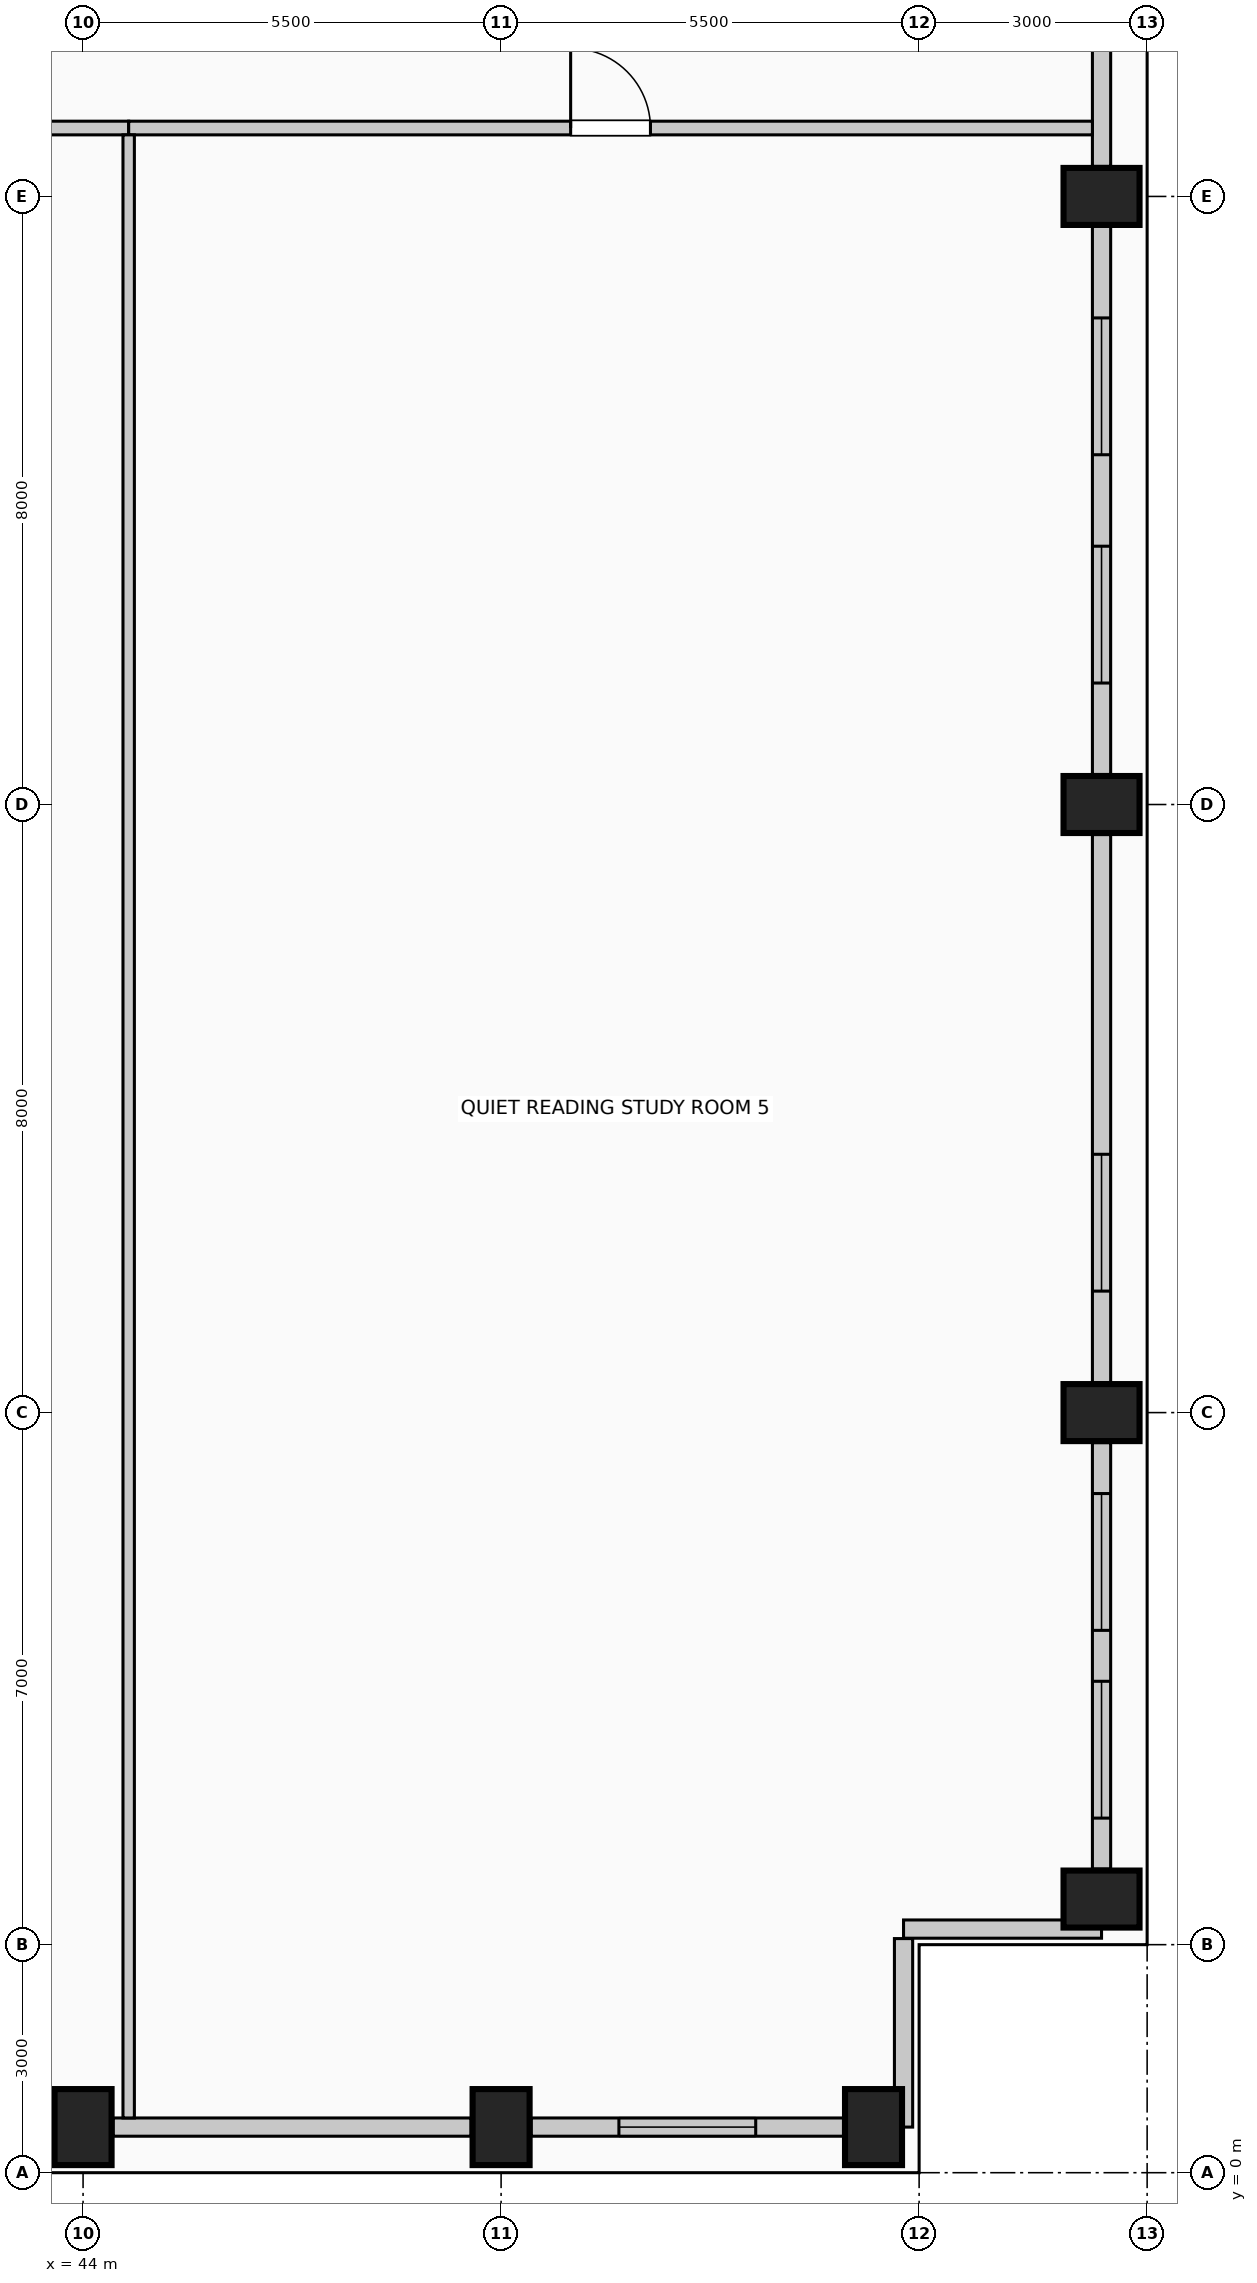
"""IFC4 building model, lengths in metres.
Left out: names, types, materials, properties, quantities, classifications, styles, units other than length and angle.
Written with IfcOpenShell. Run it as: python <this file> out.ifc"""

import sys

from ifc_helpers import new_model, si_unit, direction, frame, frame_2d, origin, origin_2d, place, context, subcontext, project, spatial, rectangle, extrude, element, fill, save


model = new_model("IFC4")
c1 = context("Model", 3, precision=1e-05, world=origin(), true_north=direction((0.0, 1.0)))
c2 = subcontext(c1, "Body", "Model", "MODEL_VIEW")
j1 = project(units=[si_unit("LENGTHUNIT", "METRE"), si_unit("PLANEANGLEUNIT", "RADIAN")], contexts=[c1])
p1 = place(None, origin())
s1 = spatial("IfcSite", under=j1, at=p1, CompositionType="ELEMENT")
p2 = place(p1, origin())
s2 = spatial("IfcBuilding", under=s1, at=p2, CompositionType="ELEMENT")
p3 = place(p2, frame((0.0, 0.0, 230.6)))
s3 = spatial("IfcBuildingStorey", under=s2, at=p3, CompositionType="ELEMENT", Elevation=230.6)
for number, where, z_axis, x_axis in (
    (1, (44.0, 0.6, 0.0), (0.0, 0.0, 1.0), (1.0, 0.0, 0.0)),
    (2, (49.5, 0.6, 0.0), (0.0, 0.0, 1.0), (1.0, 0.0, 0.0)),
    (3, (54.4, 0.6, 0.0), (0.0, 0.0, 1.0), (1.0, 0.0, 0.0)),
    (4, (57.4, 3.6, 0.0), (0.0, 0.0, 1.0), (0.0, 1.0, 0.0)),
    (5, (57.4, 10.0, 0.0), (0.0, 0.0, 1.0), (0.0, 1.0, 0.0)),
    (6, (57.4, 18.0, 0.0), (0.0, 0.0, 1.0), (0.0, 1.0, 0.0)),
    (7, (57.4, 26.0, 0.0), (0.0, 0.0, 1.0), (0.0, 1.0, 0.0)),
):
    element("IfcColumn", number, at=place(p3, frame(where, z_axis=z_axis, x_axis=x_axis)), inside=s3, PredefinedType="COLUMN", context=c2, shape_type="SweptSolid", body=[
        extrude(rectangle(XDim=0.75, YDim=1.0, at=origin_2d()), origin(), (0.0, 0.0, 1.0), 4.0),
    ])
p4 = place(p3, frame((43.605, 0.6, 0.0), z_axis=(0.0, 0.0, 1.0), x_axis=(-1.0, 0.0, 0.0)))
e8 = element("IfcWall", 8, at=p4, inside=s3, PredefinedType="SOLIDWALL", context=c2, shape_type="SweptSolid", body=[
    extrude(rectangle(XDim=1.485, YDim=0.24, at=frame_2d((0.742, 0.0))), origin(), (0.0, 0.0, 1.0), 3.0),
])
p5 = place(p3, frame((49.105, 0.6, 0.0), z_axis=(0.0, 0.0, 1.0), x_axis=(-1.0, 0.0, 0.0)))
e9 = element("IfcWall", 9, at=p5, inside=s3, PredefinedType="SOLIDWALL", context=c2, shape_type="SweptSolid", body=[
    extrude(rectangle(XDim=4.71, YDim=0.24, at=frame_2d((2.355, 0.0))), origin(), (0.0, 0.0, 1.0), 3.0),
])
p6 = place(p3, frame((54.005, 0.6, 0.0), z_axis=(0.0, 0.0, 1.0), x_axis=(-1.0, 0.0, 0.0)))
e10 = element("IfcWall", 10, at=p6, inside=s3, PredefinedType="SOLIDWALL", context=c2, shape_type="SweptSolid", body=[
    extrude(rectangle(XDim=4.11, YDim=0.24, at=frame_2d((2.055, 0.0))), origin(), (0.0, 0.0, 1.0), 3.0),
])
p7 = place(p6, frame((1.155, 0.0, 0.42)))
e11 = element("IfcOpeningElement", 11, at=p7, cuts=e10, PredefinedType="OPENING", context=c2, shape_type="SweptSolid", body=[
    extrude(rectangle(XDim=1.8, YDim=2.2, at=frame_2d((0.9, 1.1))), frame((0.0, 0.13, 0.0), z_axis=(0.0, -1.0, 0.0), x_axis=(1.0, 0.0, 0.0)), (0.0, 0.0, 1.0), 0.26),
])
p8 = place(p3, frame((57.4, 9.605, 0.0), z_axis=(0.0, 0.0, 1.0), x_axis=(0.0, -1.0, 0.0)))
e12 = element("IfcWall", 12, at=p8, inside=s3, PredefinedType="SOLIDWALL", context=c2, shape_type="SweptSolid", body=[
    extrude(rectangle(XDim=5.61, YDim=0.24, at=frame_2d((2.805, 0.0))), origin(), (0.0, 0.0, 1.0), 3.0),
])
p9 = place(p8, frame((0.67, 0.0, 0.42)))
e13 = element("IfcOpeningElement", 13, at=p9, cuts=e12, PredefinedType="OPENING", context=c2, shape_type="SweptSolid", body=[
    extrude(rectangle(XDim=1.8, YDim=2.2, at=frame_2d((0.9, 1.1))), frame((0.0, 0.13, 0.0), z_axis=(0.0, -1.0, 0.0), x_axis=(1.0, 0.0, 0.0)), (0.0, 0.0, 1.0), 0.26),
])
p10 = place(p8, frame((3.14, 0.0, 0.42)))
e14 = element("IfcOpeningElement", 14, at=p10, cuts=e12, PredefinedType="OPENING", context=c2, shape_type="SweptSolid", body=[
    extrude(rectangle(XDim=1.8, YDim=2.2, at=frame_2d((0.9, 1.1))), frame((0.0, 0.13, 0.0), z_axis=(0.0, -1.0, 0.0), x_axis=(1.0, 0.0, 0.0)), (0.0, 0.0, 1.0), 0.26),
])
p11 = place(p3, frame((57.4, 17.605, 0.0), z_axis=(0.0, 0.0, 1.0), x_axis=(0.0, -1.0, 0.0)))
e15 = element("IfcWall", 15, at=p11, inside=s3, PredefinedType="SOLIDWALL", context=c2, shape_type="SweptSolid", body=[
    extrude(rectangle(XDim=7.21, YDim=0.24, at=frame_2d((3.605, 0.0))), origin(), (0.0, 0.0, 1.0), 3.0),
])
p12 = place(p11, frame((4.207, 0.0, 0.42)))
e16 = element("IfcOpeningElement", 16, at=p12, cuts=e15, PredefinedType="OPENING", context=c2, shape_type="SweptSolid", body=[
    extrude(rectangle(XDim=1.8, YDim=2.2, at=frame_2d((0.9, 1.1))), frame((0.0, 0.13, 0.0), z_axis=(0.0, -1.0, 0.0), x_axis=(1.0, 0.0, 0.0)), (0.0, 0.0, 1.0), 0.26),
])
p13 = place(p3, frame((57.4, 25.605, 0.0), z_axis=(0.0, 0.0, 1.0), x_axis=(0.0, -1.0, 0.0)))
e17 = element("IfcWall", 17, at=p13, inside=s3, PredefinedType="SOLIDWALL", context=c2, shape_type="SweptSolid", body=[
    extrude(rectangle(XDim=7.21, YDim=0.24, at=frame_2d((3.605, 0.0))), origin(), (0.0, 0.0, 1.0), 3.0),
])
p14 = place(p13, frame((1.203, 0.0, 0.42)))
e18 = element("IfcOpeningElement", 18, at=p14, cuts=e17, PredefinedType="OPENING", context=c2, shape_type="SweptSolid", body=[
    extrude(rectangle(XDim=1.8, YDim=2.2, at=frame_2d((0.9, 1.1))), frame((0.0, 0.13, 0.0), z_axis=(0.0, -1.0, 0.0), x_axis=(1.0, 0.0, 0.0)), (0.0, 0.0, 1.0), 0.26),
])
p15 = place(p13, frame((4.207, 0.0, 0.42)))
e19 = element("IfcOpeningElement", 19, at=p15, cuts=e17, PredefinedType="OPENING", context=c2, shape_type="SweptSolid", body=[
    extrude(rectangle(XDim=1.8, YDim=2.2, at=frame_2d((0.9, 1.1))), frame((0.0, 0.13, 0.0), z_axis=(0.0, -1.0, 0.0), x_axis=(1.0, 0.0, 0.0)), (0.0, 0.0, 1.0), 0.26),
])
p16 = place(p3, frame((57.4, 33.605, 0.0), z_axis=(0.0, 0.0, 1.0), x_axis=(0.0, -1.0, 0.0)))
e20 = element("IfcWall", 20, at=p16, inside=s3, PredefinedType="SOLIDWALL", context=c2, shape_type="SweptSolid", body=[
    extrude(rectangle(XDim=7.21, YDim=0.24, at=frame_2d((3.605, 0.0))), origin(), (0.0, 0.0, 1.0), 3.0),
])
p17 = place(p3, frame((57.4, 3.205, 0.0), z_axis=(0.0, 0.0, 1.0), x_axis=(-1.0, 0.0, 0.0)))
e21 = element("IfcWall", 21, at=p17, inside=s3, PredefinedType="SOLIDWALL", context=c2, shape_type="SweptSolid", body=[
    extrude(rectangle(XDim=2.605, YDim=0.24, at=frame_2d((1.302, 0.0))), origin(), (0.0, 0.0, 1.0), 3.75),
])
p18 = place(p3, frame((54.795, 3.08, 0.0), z_axis=(0.0, 0.0, 1.0), x_axis=(0.0, -1.0, 0.0)))
e22 = element("IfcWall", 22, at=p18, inside=s3, PredefinedType="SOLIDWALL", context=c2, shape_type="SweptSolid", body=[
    extrude(rectangle(XDim=2.48, YDim=0.24, at=frame_2d((1.24, 0.0))), origin(), (0.0, 0.0, 1.0), 3.75),
])
p19 = place(p3, frame((37.9, 26.9, 0.0), z_axis=(0.0, 0.0, 1.0), x_axis=(1.0, 0.0, 0.0)))
e23 = element("IfcWall", 23, at=p19, inside=s3, PredefinedType="PARTITIONING", context=c2, shape_type="SweptSolid", body=[
    extrude(rectangle(XDim=6.7, YDim=0.18, at=frame_2d((3.35, 0.0))), origin(), (0.0, 0.0, 1.0), 3.75),
])
p20 = place(p19, frame((2.875, 0.0, 0.0)))
e24 = element("IfcOpeningElement", 24, at=p20, cuts=e23, PredefinedType="OPENING", context=c2, shape_type="SweptSolid", body=[
    extrude(rectangle(XDim=0.95, YDim=2.15, at=frame_2d((0.475, 1.075))), frame((0.0, 0.1, 0.0), z_axis=(0.0, -1.0, 0.0), x_axis=(1.0, 0.0, 0.0)), (0.0, 0.0, 1.0), 0.2),
])
p21 = place(p3, frame((44.6, 26.9, 0.0), z_axis=(0.0, 0.0, 1.0), x_axis=(1.0, 0.0, 0.0)))
e25 = element("IfcWall", 25, at=p21, inside=s3, PredefinedType="PARTITIONING", context=c2, shape_type="SweptSolid", body=[
    extrude(rectangle(XDim=12.68, YDim=0.18, at=frame_2d((6.34, 0.0))), origin(), (0.0, 0.0, 1.0), 3.75),
])
p22 = place(p21, frame((5.815, 0.0, 0.0)))
e26 = element("IfcOpeningElement", 26, at=p22, cuts=e25, PredefinedType="OPENING", context=c2, shape_type="SweptSolid", body=[
    extrude(rectangle(XDim=1.05, YDim=2.15, at=frame_2d((0.525, 1.075))), frame((0.0, 0.1, 0.0), z_axis=(0.0, -1.0, 0.0), x_axis=(1.0, 0.0, 0.0)), (0.0, 0.0, 1.0), 0.2),
])
p23 = place(p3, frame((44.6, 0.72, 0.0), z_axis=(0.0, 0.0, 1.0), x_axis=(0.0, 1.0, 0.0)))
e27 = element("IfcWall", 27, at=p23, inside=s3, PredefinedType="PARTITIONING", context=c2, shape_type="SweptSolid", body=[
    extrude(rectangle(XDim=26.09, YDim=0.15, at=frame_2d((13.045, 0.0))), origin(), (0.0, 0.0, 1.0), 3.75),
])
p24 = place(p7, origin())
e28 = element("IfcWindow", 28, at=p24, inside=s3, PartitioningType="SINGLE_PANEL", PredefinedType="WINDOW", context=c2, shape_type="SweptSolid", body=[
    extrude(rectangle(XDim=1.8, YDim=2.2, at=frame_2d((0.9, 1.1))), frame((0.0, 0.03, 0.0), z_axis=(0.0, -1.0, 0.0), x_axis=(1.0, 0.0, 0.0)), (0.0, 0.0, 1.0), 0.06),
])
fill(e11, e28)
p25 = place(p9, origin())
e29 = element("IfcWindow", 29, at=p25, inside=s3, PartitioningType="SINGLE_PANEL", PredefinedType="WINDOW", context=c2, shape_type="SweptSolid", body=[
    extrude(rectangle(XDim=1.8, YDim=2.2, at=frame_2d((0.9, 1.1))), frame((0.0, 0.03, 0.0), z_axis=(0.0, -1.0, 0.0), x_axis=(1.0, 0.0, 0.0)), (0.0, 0.0, 1.0), 0.06),
])
fill(e13, e29)
p26 = place(p10, origin())
e30 = element("IfcWindow", 30, at=p26, inside=s3, PartitioningType="SINGLE_PANEL", PredefinedType="WINDOW", context=c2, shape_type="SweptSolid", body=[
    extrude(rectangle(XDim=1.8, YDim=2.2, at=frame_2d((0.9, 1.1))), frame((0.0, 0.03, 0.0), z_axis=(0.0, -1.0, 0.0), x_axis=(1.0, 0.0, 0.0)), (0.0, 0.0, 1.0), 0.06),
])
fill(e14, e30)
p27 = place(p12, origin())
e31 = element("IfcWindow", 31, at=p27, inside=s3, PartitioningType="SINGLE_PANEL", PredefinedType="WINDOW", context=c2, shape_type="SweptSolid", body=[
    extrude(rectangle(XDim=1.8, YDim=2.2, at=frame_2d((0.9, 1.1))), frame((0.0, 0.03, 0.0), z_axis=(0.0, -1.0, 0.0), x_axis=(1.0, 0.0, 0.0)), (0.0, 0.0, 1.0), 0.06),
])
fill(e16, e31)
p28 = place(p14, origin())
e32 = element("IfcWindow", 32, at=p28, inside=s3, PartitioningType="SINGLE_PANEL", PredefinedType="WINDOW", context=c2, shape_type="SweptSolid", body=[
    extrude(rectangle(XDim=1.8, YDim=2.2, at=frame_2d((0.9, 1.1))), frame((0.0, 0.03, 0.0), z_axis=(0.0, -1.0, 0.0), x_axis=(1.0, 0.0, 0.0)), (0.0, 0.0, 1.0), 0.06),
])
fill(e18, e32)
p29 = place(p15, origin())
e33 = element("IfcWindow", 33, at=p29, inside=s3, PartitioningType="SINGLE_PANEL", PredefinedType="WINDOW", context=c2, shape_type="SweptSolid", body=[
    extrude(rectangle(XDim=1.8, YDim=2.2, at=frame_2d((0.9, 1.1))), frame((0.0, 0.03, 0.0), z_axis=(0.0, -1.0, 0.0), x_axis=(1.0, 0.0, 0.0)), (0.0, 0.0, 1.0), 0.06),
])
fill(e19, e33)
p30 = place(p22, origin())
e34 = element("IfcDoor", 34, at=p30, inside=s3, OperationType="SINGLE_SWING_LEFT", PredefinedType="DOOR", context=c2, shape_type="SweptSolid", body=[
    extrude(rectangle(XDim=1.05, YDim=2.15, at=frame_2d((0.525, 1.075))), frame((0.0, 0.025, 0.0), z_axis=(0.0, -1.0, 0.0), x_axis=(1.0, 0.0, 0.0)), (0.0, 0.0, 1.0), 0.05),
])
fill(e26, e34)
save(model, sys.argv[1])
